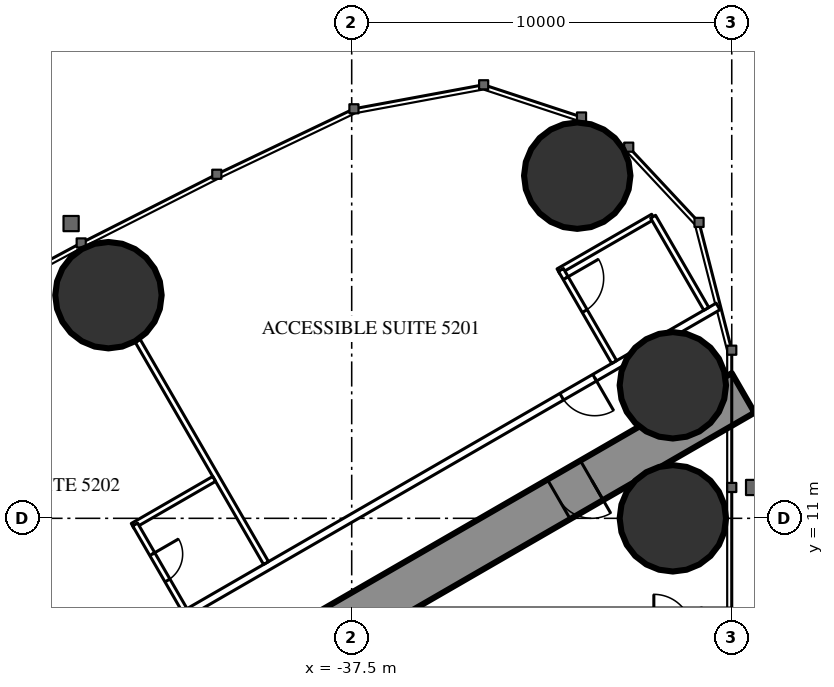
"""IFC4 building model, lengths in metres.
Left out: names, types, materials, properties, quantities, classifications, styles, units other than length and angle.
Written with IfcOpenShell. Run it as: python <this file> out.ifc"""

import sys

from ifc_helpers import new_model, si_unit, direction, frame, frame_2d, origin, origin_2d, place, context, subcontext, project, spatial, rectangle, circle, extrude, element, fill, save


model = new_model("IFC4")
c1 = context("Model", 3, precision=1e-05, world=origin(), true_north=direction((0.0, 1.0)))
c2 = subcontext(c1, "Body", "Model", "MODEL_VIEW")
j1 = project(units=[si_unit("LENGTHUNIT", "METRE"), si_unit("PLANEANGLEUNIT", "RADIAN")], contexts=[c1])
p1 = place(None, origin())
s1 = spatial("IfcSite", under=j1, at=p1, CompositionType="ELEMENT")
p2 = place(p1, origin())
s2 = spatial("IfcBuilding", under=s1, at=p2, CompositionType="ELEMENT")
p3 = place(p2, frame((0.0, 0.0, 194.8)))
s3 = spatial("IfcBuildingStorey", under=s2, at=p3, CompositionType="ELEMENT", Elevation=194.8)
for number, where, z_axis, x_axis in (
    (1, (-31.565, 20.016, 0.0), (0.0, 0.0, 1.0), (1.0, 0.0, 0.0)),
    (2, (-29.05, 11.0, 0.0), (0.0, 0.0, 1.0), (1.0, 0.0, 0.0)),
    (3, (-29.05, 14.5, 0.0), (0.0, 0.0, 1.0), (1.0, 0.0, 0.0)),
    (4, (-43.9, 16.871, 0.0), (0.0, 0.0, 1.0), (1.0, 0.0, 0.0)),
):
    element("IfcColumn", number, at=place(p3, frame(where, z_axis=z_axis, x_axis=x_axis)), inside=s3, PredefinedType="COLUMN", context=c2, shape_type="SweptSolid", body=[
        extrude(circle(Radius=1.4, at=origin_2d()), origin(), (0.0, 0.0, 1.0), 3.5),
    ])
p4 = place(p3, frame((-27.2, 14.3, 0.0), z_axis=(0.0, 0.0, 1.0), x_axis=(-0.866026593062, -0.499997940104, 0.0)))
e5 = element("IfcWall", 5, at=p4, inside=s3, PredefinedType="SHEAR", context=c2, shape_type="SweptSolid", body=[
    extrude(rectangle(XDim=28.946, YDim=1.2, at=frame_2d((14.473, 0.0))), origin(), (0.0, 0.0, 1.0), 3.5),
])
p5 = place(p4, frame((4.6, 0.0, 0.0)))
e6 = element("IfcOpeningElement", 6, at=p5, cuts=e5, PredefinedType="OPENING", context=c2, shape_type="SweptSolid", body=[
    extrude(rectangle(XDim=1.0, YDim=2.2, at=frame_2d((0.5, 1.1))), frame((0.0, 0.61, 0.0), z_axis=(0.0, -1.0, 0.0), x_axis=(1.0, 0.0, 0.0)), (0.0, 0.0, 1.0), 1.22),
])
p6 = place(p4, frame((13.395, 0.0, 0.0)))
e7 = element("IfcOpeningElement", 7, at=p6, cuts=e5, PredefinedType="OPENING", context=c2, shape_type="SweptSolid", body=[
    extrude(rectangle(XDim=1.8, YDim=2.2, at=frame_2d((0.9, 1.1))), frame((0.0, 0.61, 0.0), z_axis=(0.0, -1.0, 0.0), x_axis=(1.0, 0.0, 0.0)), (0.0, 0.0, 1.0), 1.22),
])
p7 = place(p3, frame((-27.86, 16.575, 0.0), z_axis=(0.0, 0.0, 1.0), x_axis=(-0.866025533911, -0.499999774615, 0.0)))
e8 = element("IfcWall", 8, at=p7, inside=s3, PredefinedType="PARTITIONING", context=c2, shape_type="SweptSolid", body=[
    extrude(rectangle(XDim=33.149, YDim=0.2, at=frame_2d((16.575, 0.0))), origin(), (0.0, 0.0, 1.0), 3.25),
])
p8 = place(p7, frame((3.75, 0.0, 0.0)))
e9 = element("IfcOpeningElement", 9, at=p8, cuts=e8, PredefinedType="OPENING", context=c2, shape_type="SweptSolid", body=[
    extrude(rectangle(XDim=1.0, YDim=2.2, at=frame_2d((0.5, 1.1))), frame((0.0, 0.11, 0.0), z_axis=(0.0, -1.0, 0.0), x_axis=(1.0, 0.0, 0.0)), (0.0, 0.0, 1.0), 0.22),
])
p9 = place(p7, frame((16.402, 0.0, 0.0)))
e10 = element("IfcOpeningElement", 10, at=p9, cuts=e8, PredefinedType="OPENING", context=c2, shape_type="SweptSolid", body=[
    extrude(rectangle(XDim=0.95, YDim=2.2, at=frame_2d((0.475, 1.1))), frame((0.0, 0.11, 0.0), z_axis=(0.0, -1.0, 0.0), x_axis=(1.0, 0.0, 0.0)), (0.0, 0.0, 1.0), 0.22),
])
p10 = place(p7, frame((22.047, 0.0, 0.0)))
e11 = element("IfcOpeningElement", 11, at=p10, cuts=e8, PredefinedType="OPENING", context=c2, shape_type="SweptSolid", body=[
    extrude(rectangle(XDim=0.95, YDim=2.2, at=frame_2d((0.475, 1.1))), frame((0.0, 0.11, 0.0), z_axis=(0.0, -1.0, 0.0), x_axis=(1.0, 0.0, 0.0)), (0.0, 0.0, 1.0), 0.22),
])
p11 = place(p7, frame((30.396, 0.0, 0.0)))
e12 = element("IfcOpeningElement", 12, at=p11, cuts=e8, PredefinedType="OPENING", context=c2, shape_type="SweptSolid", body=[
    extrude(rectangle(XDim=1.8, YDim=2.2, at=frame_2d((0.9, 1.1))), frame((0.0, 0.11, 0.0), z_axis=(0.0, -1.0, 0.0), x_axis=(1.0, 0.0, 0.0)), (0.0, 0.0, 1.0), 0.22),
])
p12 = place(p3, frame((-39.754, 9.823, 0.0), z_axis=(0.0, 0.0, 1.0), x_axis=(-0.499997670926, 0.866026748472, 0.0)))
e13 = element("IfcWall", 13, at=p12, inside=s3, PredefinedType="PARTITIONING", context=c2, shape_type="SweptSolid", body=[
    extrude(rectangle(XDim=6.757, YDim=0.15, at=frame_2d((3.379, 0.0))), origin(), (0.0, 0.0, 1.0), 2.3),
])
p13 = place(p3, frame((-29.57, 18.936, 0.0), z_axis=(0.0, 0.0, 1.0), x_axis=(-0.866018712932, -0.500011588718, 0.0)))
e14 = element("IfcWall", 14, at=p13, inside=s3, PredefinedType="PARTITIONING", context=c2, shape_type="SweptSolid", body=[
    extrude(rectangle(XDim=2.875, YDim=0.15, at=frame_2d((1.438, 0.0))), origin(), (0.0, 0.0, 1.0), 3.25),
])
p14 = place(p3, frame((-30.595, 15.111, 0.0), z_axis=(0.0, 0.0, 1.0), x_axis=(-0.49998411664, 0.866034573852, 0.0)))
e15 = element("IfcWall", 15, at=p14, inside=s3, PredefinedType="PARTITIONING", context=c2, shape_type="SweptSolid", body=[
    extrude(rectangle(XDim=2.8, YDim=0.15, at=frame_2d((1.4, 0.0))), origin(), (0.0, 0.0, 1.0), 3.25),
])
p15 = place(p14, frame((1.55, 0.0, 0.0)))
e16 = element("IfcOpeningElement", 16, at=p15, cuts=e15, PredefinedType="OPENING", context=c2, shape_type="SweptSolid", body=[
    extrude(rectangle(XDim=1.0, YDim=2.2, at=frame_2d((0.5, 1.1))), frame((0.0, 0.085, 0.0), z_axis=(0.0, -1.0, 0.0), x_axis=(1.0, 0.0, 0.0)), (0.0, 0.0, 1.0), 0.17),
])
p16 = place(p3, frame((-28.17, 16.511, 0.0), z_axis=(0.0, 0.0, 1.0), x_axis=(-0.49994636267, 0.866056369097, 0.0)))
e17 = element("IfcWall", 17, at=p16, inside=s3, PredefinedType="PARTITIONING", context=c2, shape_type="SweptSolid", body=[
    extrude(rectangle(XDim=2.8, YDim=0.15, at=frame_2d((1.4, 0.0))), origin(), (0.0, 0.0, 1.0), 3.25),
])
p17 = place(p3, frame((-41.119, 12.037, 0.0), z_axis=(0.0, 0.0, 1.0), x_axis=(-0.866073894602, -0.499916002032, 0.0)))
e18 = element("IfcWall", 18, at=p17, inside=s3, PredefinedType="PARTITIONING", context=c2, shape_type="SweptSolid", body=[
    extrude(rectangle(XDim=2.475, YDim=0.15, at=frame_2d((1.238, 0.0))), origin(), (0.0, 0.0, 1.0), 3.25),
])
p18 = place(p3, frame((-41.898, 8.585, 0.0), z_axis=(0.0, 0.0, 1.0), x_axis=(-0.500006934395, 0.866021400173, 0.0)))
e19 = element("IfcWall", 19, at=p18, inside=s3, PredefinedType="PARTITIONING", context=c2, shape_type="SweptSolid", body=[
    extrude(rectangle(XDim=2.6, YDim=0.15, at=frame_2d((1.3, 0.0))), origin(), (0.0, 0.0, 1.0), 3.25),
])
p19 = place(p18, frame((0.9, 0.0, 0.0)))
e20 = element("IfcOpeningElement", 20, at=p19, cuts=e19, PredefinedType="OPENING", context=c2, shape_type="SweptSolid", body=[
    extrude(rectangle(XDim=0.8, YDim=2.2, at=frame_2d((0.4, 1.1))), frame((0.0, 0.085, 0.0), z_axis=(0.0, -1.0, 0.0), x_axis=(1.0, 0.0, 0.0)), (0.0, 0.0, 1.0), 0.17),
])
p20 = place(p15, origin())
e21 = element("IfcDoor", 21, at=p20, inside=s3, OperationType="SINGLE_SWING_RIGHT", PredefinedType="DOOR", context=c2, shape_type="SweptSolid", body=[
    extrude(rectangle(XDim=1.0, YDim=2.2, at=frame_2d((0.5, 1.1))), frame((0.0, 0.025, 0.0), z_axis=(0.0, -1.0, 0.0), x_axis=(1.0, 0.0, 0.0)), (0.0, 0.0, 1.0), 0.05),
])
fill(e16, e21)
p21 = place(p8, origin())
e22 = element("IfcDoor", 22, at=p21, inside=s3, OperationType="SINGLE_SWING_LEFT", PredefinedType="DOOR", context=c2, shape_type="SweptSolid", body=[
    extrude(rectangle(XDim=1.0, YDim=2.2, at=frame_2d((0.5, 1.1))), frame((0.0, 0.025, 0.0), z_axis=(0.0, -1.0, 0.0), x_axis=(1.0, 0.0, 0.0)), (0.0, 0.0, 1.0), 0.05),
])
fill(e9, e22)
p22 = place(p19, origin())
e23 = element("IfcDoor", 23, at=p22, inside=s3, OperationType="SINGLE_SWING_RIGHT", PredefinedType="DOOR", context=c2, shape_type="SweptSolid", body=[
    extrude(rectangle(XDim=0.8, YDim=2.2, at=frame_2d((0.4, 1.1))), frame((0.0, 0.025, 0.0), z_axis=(0.0, -1.0, 0.0), x_axis=(1.0, 0.0, 0.0)), (0.0, 0.0, 1.0), 0.05),
])
fill(e20, e23)
p23 = place(p5, origin())
e24 = element("IfcDoor", 24, at=p23, inside=s3, OperationType="SINGLE_SWING_LEFT", PredefinedType="DOOR", context=c2, shape_type="SweptSolid", body=[
    extrude(rectangle(XDim=1.0, YDim=2.2, at=frame_2d((0.5, 1.1))), frame((0.0, 0.025, 0.0), z_axis=(0.0, -1.0, 0.0), x_axis=(1.0, 0.0, 0.0)), (0.0, 0.0, 1.0), 0.05),
])
fill(e6, e24)
save(model, sys.argv[1])
